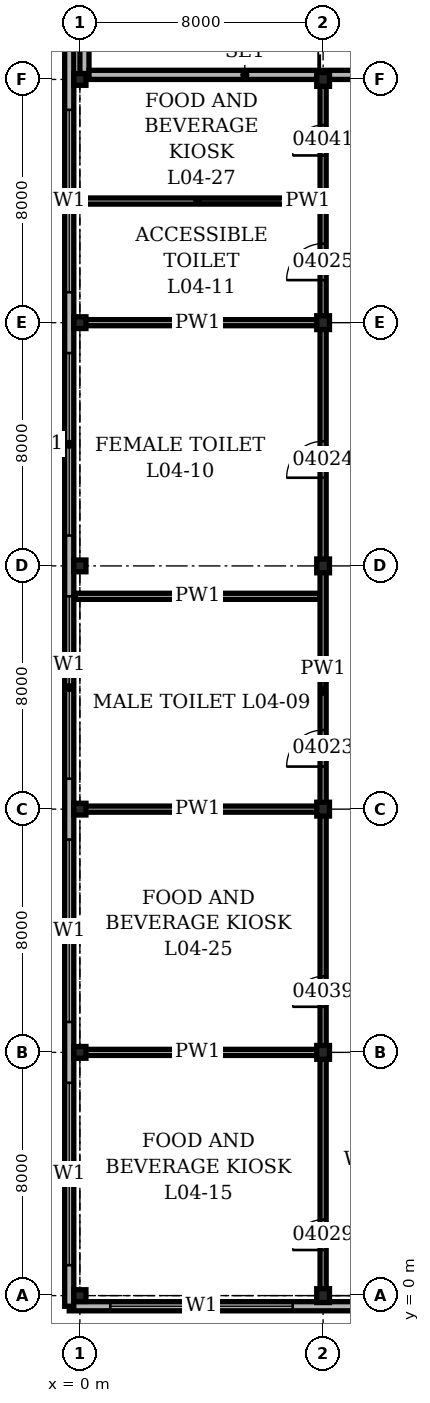
"""IFC4 building model, lengths in metres.
Left out: names, types, materials, properties, quantities, classifications, styles, units other than length and angle.
Written with IfcOpenShell. Run it as: python <this file> out.ifc"""

import sys

from ifc_helpers import new_model, si_unit, direction, frame, frame_2d, origin, origin_2d, place, context, subcontext, project, spatial, rectangle, i_section, extrude, element, fill, save


model = new_model("IFC4")
c1 = context("Model", 3, precision=1e-05, world=origin(), true_north=direction((0.0, 1.0)))
c2 = subcontext(c1, "Body", "Model", "MODEL_VIEW")
j1 = project(units=[si_unit("LENGTHUNIT", "METRE"), si_unit("PLANEANGLEUNIT", "RADIAN")], contexts=[c1])
p1 = place(None, origin())
s1 = spatial("IfcSite", under=j1, at=p1, CompositionType="ELEMENT")
p2 = place(p1, origin())
s2 = spatial("IfcBuilding", under=s1, at=p2, CompositionType="ELEMENT")
p3 = place(p2, frame((0.0, 0.0, 19.9)))
s3 = spatial("IfcBuildingStorey", under=s2, at=p3, CompositionType="ELEMENT", Elevation=19.9)
for number, where, z_axis, x_axis in (
    (1, (0.0, 0.0, 0.0), (0.0, 0.0, 1.0), (1.0, 0.0, 0.0)),
    (2, (0.0, 8.0, 0.0), (0.0, 0.0, 1.0), (1.0, 0.0, 0.0)),
    (3, (0.0, 16.0, 0.0), (0.0, 0.0, 1.0), (1.0, 0.0, 0.0)),
    (4, (0.0, 24.0, 0.0), (0.0, 0.0, 1.0), (1.0, 0.0, 0.0)),
    (5, (0.0, 32.0, 0.0), (0.0, 0.0, 1.0), (1.0, 0.0, 0.0)),
    (6, (0.0, 40.0, 0.0), (0.0, 0.0, 1.0), (1.0, 0.0, 0.0)),
):
    element("IfcColumn", number, at=place(p3, frame(where, z_axis=z_axis, x_axis=x_axis)), inside=s3, PredefinedType="COLUMN", context=c2, shape_type="SweptSolid", body=[
        extrude(i_section(OverallWidth=0.399, OverallDepth=0.386, WebThickness=0.021, FlangeThickness=0.033, at=origin_2d()), origin(), (0.0, 0.0, 1.0), 6.0),
    ])
for number, where, z_axis, x_axis in (
    (7, (8.0, 0.0, 0.0), (0.0, 0.0, 1.0), (1.0, 0.0, 0.0)),
    (8, (8.0, 8.0, 0.0), (0.0, 0.0, 1.0), (1.0, 0.0, 0.0)),
    (9, (8.0, 16.0, 0.0), (0.0, 0.0, 1.0), (1.0, 0.0, 0.0)),
    (10, (8.0, 24.0, 0.0), (0.0, 0.0, 1.0), (1.0, 0.0, 0.0)),
    (11, (8.0, 32.0, 0.0), (0.0, 0.0, 1.0), (1.0, 0.0, 0.0)),
    (12, (8.0, 40.0, 0.0), (0.0, 0.0, 1.0), (1.0, 0.0, 0.0)),
):
    element("IfcColumn", number, at=place(p3, frame(where, z_axis=z_axis, x_axis=x_axis)), inside=s3, PredefinedType="COLUMN", context=c2, shape_type="SweptSolid", body=[
        extrude(i_section(OverallWidth=0.419, OverallDepth=0.455, WebThickness=0.042, FlangeThickness=0.068, at=origin_2d()), origin(), (0.0, 0.0, 1.0), 6.0),
    ])
p4 = place(p3, frame((-0.35, -0.35, 0.0), z_axis=(0.0, 0.0, 1.0), x_axis=(1.0, 0.0, 0.0)))
e13 = element("IfcWall", 13, at=p4, inside=s3, PredefinedType="SOLIDWALL", context=c2, shape_type="SweptSolid", body=[
    extrude(rectangle(XDim=112.7, YDim=0.3, at=frame_2d((56.35, 0.0))), origin(), (0.0, 0.0, 1.0), 6.0),
])
p5 = place(p4, frame((1.35, 0.0, 1.0)))
e14 = element("IfcOpeningElement", 14, at=p5, cuts=e13, PredefinedType="OPENING", context=c2, shape_type="SweptSolid", body=[
    extrude(rectangle(XDim=6.0, YDim=1.5, at=frame_2d((3.0, 0.75))), frame((0.0, 0.16, 0.0), z_axis=(0.0, -1.0, 0.0), x_axis=(1.0, 0.0, 0.0)), (0.0, 0.0, 1.0), 0.32),
])
p6 = place(p4, frame((9.35, 0.0, 1.0)))
e15 = element("IfcOpeningElement", 15, at=p6, cuts=e13, PredefinedType="OPENING", context=c2, shape_type="SweptSolid", body=[
    extrude(rectangle(XDim=6.0, YDim=1.5, at=frame_2d((3.0, 0.75))), frame((0.0, 0.16, 0.0), z_axis=(0.0, -1.0, 0.0), x_axis=(1.0, 0.0, 0.0)), (0.0, 0.0, 1.0), 0.32),
])
p7 = place(p4, frame((17.35, 0.0, 1.0)))
e16 = element("IfcOpeningElement", 16, at=p7, cuts=e13, PredefinedType="OPENING", context=c2, shape_type="SweptSolid", body=[
    extrude(rectangle(XDim=6.0, YDim=1.5, at=frame_2d((3.0, 0.75))), frame((0.0, 0.16, 0.0), z_axis=(0.0, -1.0, 0.0), x_axis=(1.0, 0.0, 0.0)), (0.0, 0.0, 1.0), 0.32),
])
p8 = place(p4, frame((25.35, 0.0, 1.0)))
e17 = element("IfcOpeningElement", 17, at=p8, cuts=e13, PredefinedType="OPENING", context=c2, shape_type="SweptSolid", body=[
    extrude(rectangle(XDim=6.0, YDim=1.5, at=frame_2d((3.0, 0.75))), frame((0.0, 0.16, 0.0), z_axis=(0.0, -1.0, 0.0), x_axis=(1.0, 0.0, 0.0)), (0.0, 0.0, 1.0), 0.32),
])
p9 = place(p4, frame((33.35, 0.0, 1.0)))
e18 = element("IfcOpeningElement", 18, at=p9, cuts=e13, PredefinedType="OPENING", context=c2, shape_type="SweptSolid", body=[
    extrude(rectangle(XDim=6.0, YDim=1.5, at=frame_2d((3.0, 0.75))), frame((0.0, 0.16, 0.0), z_axis=(0.0, -1.0, 0.0), x_axis=(1.0, 0.0, 0.0)), (0.0, 0.0, 1.0), 0.32),
])
p10 = place(p4, frame((41.35, 0.0, 1.0)))
e19 = element("IfcOpeningElement", 19, at=p10, cuts=e13, PredefinedType="OPENING", context=c2, shape_type="SweptSolid", body=[
    extrude(rectangle(XDim=6.0, YDim=1.5, at=frame_2d((3.0, 0.75))), frame((0.0, 0.16, 0.0), z_axis=(0.0, -1.0, 0.0), x_axis=(1.0, 0.0, 0.0)), (0.0, 0.0, 1.0), 0.32),
])
p11 = place(p4, frame((49.35, 0.0, 1.0)))
e20 = element("IfcOpeningElement", 20, at=p11, cuts=e13, PredefinedType="OPENING", context=c2, shape_type="SweptSolid", body=[
    extrude(rectangle(XDim=6.0, YDim=1.5, at=frame_2d((3.0, 0.75))), frame((0.0, 0.16, 0.0), z_axis=(0.0, -1.0, 0.0), x_axis=(1.0, 0.0, 0.0)), (0.0, 0.0, 1.0), 0.32),
])
p12 = place(p4, frame((57.35, 0.0, 1.0)))
e21 = element("IfcOpeningElement", 21, at=p12, cuts=e13, PredefinedType="OPENING", context=c2, shape_type="SweptSolid", body=[
    extrude(rectangle(XDim=6.0, YDim=1.5, at=frame_2d((3.0, 0.75))), frame((0.0, 0.16, 0.0), z_axis=(0.0, -1.0, 0.0), x_axis=(1.0, 0.0, 0.0)), (0.0, 0.0, 1.0), 0.32),
])
p13 = place(p4, frame((65.35, 0.0, 1.0)))
e22 = element("IfcOpeningElement", 22, at=p13, cuts=e13, PredefinedType="OPENING", context=c2, shape_type="SweptSolid", body=[
    extrude(rectangle(XDim=6.0, YDim=1.5, at=frame_2d((3.0, 0.75))), frame((0.0, 0.16, 0.0), z_axis=(0.0, -1.0, 0.0), x_axis=(1.0, 0.0, 0.0)), (0.0, 0.0, 1.0), 0.32),
])
p14 = place(p4, frame((73.35, 0.0, 1.0)))
e23 = element("IfcOpeningElement", 23, at=p14, cuts=e13, PredefinedType="OPENING", context=c2, shape_type="SweptSolid", body=[
    extrude(rectangle(XDim=6.0, YDim=1.5, at=frame_2d((3.0, 0.75))), frame((0.0, 0.16, 0.0), z_axis=(0.0, -1.0, 0.0), x_axis=(1.0, 0.0, 0.0)), (0.0, 0.0, 1.0), 0.32),
])
p15 = place(p4, frame((81.35, 0.0, 1.0)))
e24 = element("IfcOpeningElement", 24, at=p15, cuts=e13, PredefinedType="OPENING", context=c2, shape_type="SweptSolid", body=[
    extrude(rectangle(XDim=6.0, YDim=1.5, at=frame_2d((3.0, 0.75))), frame((0.0, 0.16, 0.0), z_axis=(0.0, -1.0, 0.0), x_axis=(1.0, 0.0, 0.0)), (0.0, 0.0, 1.0), 0.32),
])
p16 = place(p4, frame((89.35, 0.0, 1.0)))
e25 = element("IfcOpeningElement", 25, at=p16, cuts=e13, PredefinedType="OPENING", context=c2, shape_type="SweptSolid", body=[
    extrude(rectangle(XDim=6.0, YDim=1.5, at=frame_2d((3.0, 0.75))), frame((0.0, 0.16, 0.0), z_axis=(0.0, -1.0, 0.0), x_axis=(1.0, 0.0, 0.0)), (0.0, 0.0, 1.0), 0.32),
])
p17 = place(p4, frame((97.35, 0.0, 1.0)))
e26 = element("IfcOpeningElement", 26, at=p17, cuts=e13, PredefinedType="OPENING", context=c2, shape_type="SweptSolid", body=[
    extrude(rectangle(XDim=6.0, YDim=1.5, at=frame_2d((3.0, 0.75))), frame((0.0, 0.16, 0.0), z_axis=(0.0, -1.0, 0.0), x_axis=(1.0, 0.0, 0.0)), (0.0, 0.0, 1.0), 0.32),
])
p18 = place(p4, frame((105.35, 0.0, 1.0)))
e27 = element("IfcOpeningElement", 27, at=p18, cuts=e13, PredefinedType="OPENING", context=c2, shape_type="SweptSolid", body=[
    extrude(rectangle(XDim=6.0, YDim=1.5, at=frame_2d((3.0, 0.75))), frame((0.0, 0.16, 0.0), z_axis=(0.0, -1.0, 0.0), x_axis=(1.0, 0.0, 0.0)), (0.0, 0.0, 1.0), 0.32),
])
p19 = place(p3, frame((-0.35, 112.35, 0.0), z_axis=(0.0, 0.0, 1.0), x_axis=(0.0, -1.0, 0.0)))
e28 = element("IfcWall", 28, at=p19, inside=s3, PredefinedType="SOLIDWALL", context=c2, shape_type="SweptSolid", body=[
    extrude(rectangle(XDim=112.7, YDim=0.3, at=frame_2d((56.35, 0.0))), origin(), (0.0, 0.0, 1.0), 6.0),
])
p20 = place(p19, frame((1.35, 0.0, 1.0)))
e29 = element("IfcOpeningElement", 29, at=p20, cuts=e28, PredefinedType="OPENING", context=c2, shape_type="SweptSolid", body=[
    extrude(rectangle(XDim=6.0, YDim=1.5, at=frame_2d((3.0, 0.75))), frame((0.0, 0.16, 0.0), z_axis=(0.0, -1.0, 0.0), x_axis=(1.0, 0.0, 0.0)), (0.0, 0.0, 1.0), 0.32),
])
p21 = place(p19, frame((9.35, 0.0, 1.0)))
e30 = element("IfcOpeningElement", 30, at=p21, cuts=e28, PredefinedType="OPENING", context=c2, shape_type="SweptSolid", body=[
    extrude(rectangle(XDim=6.0, YDim=1.5, at=frame_2d((3.0, 0.75))), frame((0.0, 0.16, 0.0), z_axis=(0.0, -1.0, 0.0), x_axis=(1.0, 0.0, 0.0)), (0.0, 0.0, 1.0), 0.32),
])
p22 = place(p19, frame((17.35, 0.0, 1.0)))
e31 = element("IfcOpeningElement", 31, at=p22, cuts=e28, PredefinedType="OPENING", context=c2, shape_type="SweptSolid", body=[
    extrude(rectangle(XDim=6.0, YDim=1.5, at=frame_2d((3.0, 0.75))), frame((0.0, 0.16, 0.0), z_axis=(0.0, -1.0, 0.0), x_axis=(1.0, 0.0, 0.0)), (0.0, 0.0, 1.0), 0.32),
])
p23 = place(p19, frame((25.35, 0.0, 1.0)))
e32 = element("IfcOpeningElement", 32, at=p23, cuts=e28, PredefinedType="OPENING", context=c2, shape_type="SweptSolid", body=[
    extrude(rectangle(XDim=6.0, YDim=1.5, at=frame_2d((3.0, 0.75))), frame((0.0, 0.16, 0.0), z_axis=(0.0, -1.0, 0.0), x_axis=(1.0, 0.0, 0.0)), (0.0, 0.0, 1.0), 0.32),
])
p24 = place(p19, frame((33.35, 0.0, 1.0)))
e33 = element("IfcOpeningElement", 33, at=p24, cuts=e28, PredefinedType="OPENING", context=c2, shape_type="SweptSolid", body=[
    extrude(rectangle(XDim=6.0, YDim=1.5, at=frame_2d((3.0, 0.75))), frame((0.0, 0.16, 0.0), z_axis=(0.0, -1.0, 0.0), x_axis=(1.0, 0.0, 0.0)), (0.0, 0.0, 1.0), 0.32),
])
p25 = place(p19, frame((41.35, 0.0, 1.0)))
e34 = element("IfcOpeningElement", 34, at=p25, cuts=e28, PredefinedType="OPENING", context=c2, shape_type="SweptSolid", body=[
    extrude(rectangle(XDim=6.0, YDim=1.5, at=frame_2d((3.0, 0.75))), frame((0.0, 0.16, 0.0), z_axis=(0.0, -1.0, 0.0), x_axis=(1.0, 0.0, 0.0)), (0.0, 0.0, 1.0), 0.32),
])
p26 = place(p19, frame((49.35, 0.0, 1.0)))
e35 = element("IfcOpeningElement", 35, at=p26, cuts=e28, PredefinedType="OPENING", context=c2, shape_type="SweptSolid", body=[
    extrude(rectangle(XDim=6.0, YDim=1.5, at=frame_2d((3.0, 0.75))), frame((0.0, 0.16, 0.0), z_axis=(0.0, -1.0, 0.0), x_axis=(1.0, 0.0, 0.0)), (0.0, 0.0, 1.0), 0.32),
])
p27 = place(p19, frame((57.35, 0.0, 1.0)))
e36 = element("IfcOpeningElement", 36, at=p27, cuts=e28, PredefinedType="OPENING", context=c2, shape_type="SweptSolid", body=[
    extrude(rectangle(XDim=6.0, YDim=1.5, at=frame_2d((3.0, 0.75))), frame((0.0, 0.16, 0.0), z_axis=(0.0, -1.0, 0.0), x_axis=(1.0, 0.0, 0.0)), (0.0, 0.0, 1.0), 0.32),
])
p28 = place(p19, frame((65.35, 0.0, 1.0)))
e37 = element("IfcOpeningElement", 37, at=p28, cuts=e28, PredefinedType="OPENING", context=c2, shape_type="SweptSolid", body=[
    extrude(rectangle(XDim=6.0, YDim=1.5, at=frame_2d((3.0, 0.75))), frame((0.0, 0.16, 0.0), z_axis=(0.0, -1.0, 0.0), x_axis=(1.0, 0.0, 0.0)), (0.0, 0.0, 1.0), 0.32),
])
p29 = place(p19, frame((73.35, 0.0, 1.0)))
e38 = element("IfcOpeningElement", 38, at=p29, cuts=e28, PredefinedType="OPENING", context=c2, shape_type="SweptSolid", body=[
    extrude(rectangle(XDim=6.0, YDim=1.5, at=frame_2d((3.0, 0.75))), frame((0.0, 0.16, 0.0), z_axis=(0.0, -1.0, 0.0), x_axis=(1.0, 0.0, 0.0)), (0.0, 0.0, 1.0), 0.32),
])
p30 = place(p19, frame((81.35, 0.0, 1.0)))
e39 = element("IfcOpeningElement", 39, at=p30, cuts=e28, PredefinedType="OPENING", context=c2, shape_type="SweptSolid", body=[
    extrude(rectangle(XDim=6.0, YDim=1.5, at=frame_2d((3.0, 0.75))), frame((0.0, 0.16, 0.0), z_axis=(0.0, -1.0, 0.0), x_axis=(1.0, 0.0, 0.0)), (0.0, 0.0, 1.0), 0.32),
])
p31 = place(p19, frame((89.35, 0.0, 1.0)))
e40 = element("IfcOpeningElement", 40, at=p31, cuts=e28, PredefinedType="OPENING", context=c2, shape_type="SweptSolid", body=[
    extrude(rectangle(XDim=6.0, YDim=1.5, at=frame_2d((3.0, 0.75))), frame((0.0, 0.16, 0.0), z_axis=(0.0, -1.0, 0.0), x_axis=(1.0, 0.0, 0.0)), (0.0, 0.0, 1.0), 0.32),
])
p32 = place(p19, frame((97.35, 0.0, 1.0)))
e41 = element("IfcOpeningElement", 41, at=p32, cuts=e28, PredefinedType="OPENING", context=c2, shape_type="SweptSolid", body=[
    extrude(rectangle(XDim=6.0, YDim=1.5, at=frame_2d((3.0, 0.75))), frame((0.0, 0.16, 0.0), z_axis=(0.0, -1.0, 0.0), x_axis=(1.0, 0.0, 0.0)), (0.0, 0.0, 1.0), 0.32),
])
p33 = place(p19, frame((105.35, 0.0, 1.0)))
e42 = element("IfcOpeningElement", 42, at=p33, cuts=e28, PredefinedType="OPENING", context=c2, shape_type="SweptSolid", body=[
    extrude(rectangle(XDim=6.0, YDim=1.5, at=frame_2d((3.0, 0.75))), frame((0.0, 0.16, 0.0), z_axis=(0.0, -1.0, 0.0), x_axis=(1.0, 0.0, 0.0)), (0.0, 0.0, 1.0), 0.32),
])
p34 = place(p3, frame((0.15, 40.193, 0.0), z_axis=(0.0, 0.0, 1.0), x_axis=(0.0, 1.0, 0.0)))
e43 = element("IfcWall", 43, at=p34, inside=s3, PredefinedType="SOLIDWALL", context=c2, shape_type="SweptSolid", body=[
    extrude(rectangle(XDim=7.614, YDim=0.3, at=frame_2d((3.807, 0.0))), origin(), (0.0, 0.0, 1.0), 5.75),
])
p35 = place(p3, frame((0.3, 40.15, 0.0), z_axis=(0.0, 0.0, 1.0), x_axis=(1.0, 0.0, 0.0)))
e44 = element("IfcWall", 44, at=p35, inside=s3, PredefinedType="SOLIDWALL", context=c2, shape_type="SweptSolid", body=[
    extrude(rectangle(XDim=10.25, YDim=0.3, at=frame_2d((5.125, 0.0))), origin(), (0.0, 0.0, 1.0), 5.75),
])
for number, where, z_axis, x_axis in (
    (45, (-0.15, 8.0, 0.0), (0.0, 0.0, 1.0), (1.0, 0.0, 0.0)),
    (46, (-0.15, 16.0, 0.0), (0.0, 0.0, 1.0), (1.0, 0.0, 0.0)),
):
    element("IfcWall", number, at=place(p3, frame(where, z_axis=z_axis, x_axis=x_axis)), inside=s3, PredefinedType="PARTITIONING", context=c2, shape_type="SweptSolid", body=[
        extrude(rectangle(XDim=8.05, YDim=0.2, at=frame_2d((4.025, 0.0))), origin(), (0.0, 0.0, 1.0), 4.978),
    ])
p36 = place(p3, frame((-0.15, 23.0, 0.0), z_axis=(0.0, 0.0, 1.0), x_axis=(1.0, 0.0, 0.0)))
e47 = element("IfcWall", 47, at=p36, inside=s3, PredefinedType="PARTITIONING", context=c2, shape_type="SweptSolid", body=[
    extrude(rectangle(XDim=8.05, YDim=0.2, at=frame_2d((4.025, 0.0))), origin(), (0.0, 0.0, 1.0), 5.75),
])
p37 = place(p3, frame((-0.15, 32.0, 0.0), z_axis=(0.0, 0.0, 1.0), x_axis=(1.0, 0.0, 0.0)))
e48 = element("IfcWall", 48, at=p37, inside=s3, PredefinedType="PARTITIONING", context=c2, shape_type="SweptSolid", body=[
    extrude(rectangle(XDim=8.05, YDim=0.2, at=frame_2d((4.025, 0.0))), origin(), (0.0, 0.0, 1.0), 4.978),
])
p38 = place(p3, frame((-0.15, 36.0, 0.0), z_axis=(0.0, 0.0, 1.0), x_axis=(1.0, 0.0, 0.0)))
e49 = element("IfcWall", 49, at=p38, inside=s3, PredefinedType="PARTITIONING", context=c2, shape_type="SweptSolid", body=[
    extrude(rectangle(XDim=8.05, YDim=0.2, at=frame_2d((4.025, 0.0))), origin(), (0.0, 0.0, 1.0), 5.75),
])
p39 = place(p3, frame((8.0, -0.15, 0.0), z_axis=(0.0, 0.0, 1.0), x_axis=(0.0, 1.0, 0.0)))
e50 = element("IfcWall", 50, at=p39, inside=s3, PredefinedType="PARTITIONING", context=c2, shape_type="SweptSolid", body=[
    extrude(rectangle(XDim=40.05, YDim=0.2, at=frame_2d((20.025, 0.0))), origin(), (0.0, 0.0, 1.0), 4.978),
])
p40 = place(p39, frame((17.55, 0.0, 0.0)))
e51 = element("IfcOpeningElement", 51, at=p40, cuts=e50, PredefinedType="OPENING", context=c2, shape_type="SweptSolid", body=[
    extrude(rectangle(XDim=1.2, YDim=2.1, at=frame_2d((0.6, 1.05))), frame((0.0, 0.11, 0.0), z_axis=(0.0, -1.0, 0.0), x_axis=(1.0, 0.0, 0.0)), (0.0, 0.0, 1.0), 0.22),
])
p41 = place(p39, frame((27.05, 0.0, 0.0)))
e52 = element("IfcOpeningElement", 52, at=p41, cuts=e50, PredefinedType="OPENING", context=c2, shape_type="SweptSolid", body=[
    extrude(rectangle(XDim=1.2, YDim=2.1, at=frame_2d((0.6, 1.05))), frame((0.0, 0.11, 0.0), z_axis=(0.0, -1.0, 0.0), x_axis=(1.0, 0.0, 0.0)), (0.0, 0.0, 1.0), 0.22),
])
p42 = place(p39, frame((33.55, 0.0, 0.0)))
e53 = element("IfcOpeningElement", 53, at=p42, cuts=e50, PredefinedType="OPENING", context=c2, shape_type="SweptSolid", body=[
    extrude(rectangle(XDim=1.2, YDim=2.1, at=frame_2d((0.6, 1.05))), frame((0.0, 0.11, 0.0), z_axis=(0.0, -1.0, 0.0), x_axis=(1.0, 0.0, 0.0)), (0.0, 0.0, 1.0), 0.22),
])
p43 = place(p39, frame((1.65, 0.0, 0.0)))
e54 = element("IfcOpeningElement", 54, at=p43, cuts=e50, PredefinedType="OPENING", context=c2, shape_type="SweptSolid", body=[
    extrude(rectangle(XDim=1.0, YDim=2.1, at=frame_2d((0.5, 1.05))), frame((0.0, 0.11, 0.0), z_axis=(0.0, -1.0, 0.0), x_axis=(1.0, 0.0, 0.0)), (0.0, 0.0, 1.0), 0.22),
])
p44 = place(p39, frame((9.65, 0.0, 0.0)))
e55 = element("IfcOpeningElement", 55, at=p44, cuts=e50, PredefinedType="OPENING", context=c2, shape_type="SweptSolid", body=[
    extrude(rectangle(XDim=1.0, YDim=2.1, at=frame_2d((0.5, 1.05))), frame((0.0, 0.11, 0.0), z_axis=(0.0, -1.0, 0.0), x_axis=(1.0, 0.0, 0.0)), (0.0, 0.0, 1.0), 0.22),
])
p45 = place(p39, frame((37.65, 0.0, 0.0)))
e56 = element("IfcOpeningElement", 56, at=p45, cuts=e50, PredefinedType="OPENING", context=c2, shape_type="SweptSolid", body=[
    extrude(rectangle(XDim=1.0, YDim=2.1, at=frame_2d((0.5, 1.05))), frame((0.0, 0.11, 0.0), z_axis=(0.0, -1.0, 0.0), x_axis=(1.0, 0.0, 0.0)), (0.0, 0.0, 1.0), 0.22),
])
p46 = place(p5, origin())
e57 = element("IfcWindow", 57, at=p46, inside=s3, PartitioningType="SINGLE_PANEL", PredefinedType="WINDOW", context=c2, shape_type="SweptSolid", body=[
    extrude(rectangle(XDim=6.0, YDim=1.5, at=frame_2d((3.0, 0.75))), frame((0.0, 0.03, 0.0), z_axis=(0.0, -1.0, 0.0), x_axis=(1.0, 0.0, 0.0)), (0.0, 0.0, 1.0), 0.06),
])
fill(e14, e57)
p47 = place(p29, origin())
e58 = element("IfcWindow", 58, at=p47, inside=s3, PartitioningType="SINGLE_PANEL", PredefinedType="WINDOW", context=c2, shape_type="SweptSolid", body=[
    extrude(rectangle(XDim=6.0, YDim=1.5, at=frame_2d((3.0, 0.75))), frame((0.0, 0.03, 0.0), z_axis=(0.0, -1.0, 0.0), x_axis=(1.0, 0.0, 0.0)), (0.0, 0.0, 1.0), 0.06),
])
fill(e38, e58)
p48 = place(p30, origin())
e59 = element("IfcWindow", 59, at=p48, inside=s3, PartitioningType="SINGLE_PANEL", PredefinedType="WINDOW", context=c2, shape_type="SweptSolid", body=[
    extrude(rectangle(XDim=6.0, YDim=1.5, at=frame_2d((3.0, 0.75))), frame((0.0, 0.03, 0.0), z_axis=(0.0, -1.0, 0.0), x_axis=(1.0, 0.0, 0.0)), (0.0, 0.0, 1.0), 0.06),
])
fill(e39, e59)
p49 = place(p31, origin())
e60 = element("IfcWindow", 60, at=p49, inside=s3, PartitioningType="SINGLE_PANEL", PredefinedType="WINDOW", context=c2, shape_type="SweptSolid", body=[
    extrude(rectangle(XDim=6.0, YDim=1.5, at=frame_2d((3.0, 0.75))), frame((0.0, 0.03, 0.0), z_axis=(0.0, -1.0, 0.0), x_axis=(1.0, 0.0, 0.0)), (0.0, 0.0, 1.0), 0.06),
])
fill(e40, e60)
p50 = place(p32, origin())
e61 = element("IfcWindow", 61, at=p50, inside=s3, PartitioningType="SINGLE_PANEL", PredefinedType="WINDOW", context=c2, shape_type="SweptSolid", body=[
    extrude(rectangle(XDim=6.0, YDim=1.5, at=frame_2d((3.0, 0.75))), frame((0.0, 0.03, 0.0), z_axis=(0.0, -1.0, 0.0), x_axis=(1.0, 0.0, 0.0)), (0.0, 0.0, 1.0), 0.06),
])
fill(e41, e61)
p51 = place(p33, origin())
e62 = element("IfcWindow", 62, at=p51, inside=s3, PartitioningType="SINGLE_PANEL", PredefinedType="WINDOW", context=c2, shape_type="SweptSolid", body=[
    extrude(rectangle(XDim=6.0, YDim=1.5, at=frame_2d((3.0, 0.75))), frame((0.0, 0.03, 0.0), z_axis=(0.0, -1.0, 0.0), x_axis=(1.0, 0.0, 0.0)), (0.0, 0.0, 1.0), 0.06),
])
fill(e42, e62)
p52 = place(p40, origin())
e63 = element("IfcDoor", 63, at=p52, inside=s3, OperationType="SINGLE_SWING_RIGHT", PredefinedType="DOOR", context=c2, shape_type="SweptSolid", body=[
    extrude(rectangle(XDim=1.2, YDim=2.1, at=frame_2d((0.6, 1.05))), frame((0.0, 0.1, 0.0), z_axis=(0.0, -1.0, 0.0), x_axis=(1.0, 0.0, 0.0)), (0.0, 0.0, 1.0), 0.199),
])
fill(e51, e63)
p53 = place(p41, origin())
e64 = element("IfcDoor", 64, at=p53, inside=s3, OperationType="SINGLE_SWING_RIGHT", PredefinedType="DOOR", context=c2, shape_type="SweptSolid", body=[
    extrude(rectangle(XDim=1.2, YDim=2.1, at=frame_2d((0.6, 1.05))), frame((0.0, 0.1, 0.0), z_axis=(0.0, -1.0, 0.0), x_axis=(1.0, 0.0, 0.0)), (0.0, 0.0, 1.0), 0.199),
])
fill(e52, e64)
p54 = place(p42, origin())
e65 = element("IfcDoor", 65, at=p54, inside=s3, OperationType="SINGLE_SWING_RIGHT", PredefinedType="DOOR", context=c2, shape_type="SweptSolid", body=[
    extrude(rectangle(XDim=1.2, YDim=2.1, at=frame_2d((0.6, 1.05))), frame((0.0, 0.1, 0.0), z_axis=(0.0, -1.0, 0.0), x_axis=(1.0, 0.0, 0.0)), (0.0, 0.0, 1.0), 0.199),
])
fill(e53, e65)
p55 = place(p43, origin())
e66 = element("IfcDoor", 66, at=p55, inside=s3, OperationType="SINGLE_SWING_LEFT", PredefinedType="DOOR", context=c2, shape_type="SweptSolid", body=[
    extrude(rectangle(XDim=1.0, YDim=2.1, at=frame_2d((0.5, 1.05))), frame((0.0, 0.1, 0.0), z_axis=(0.0, -1.0, 0.0), x_axis=(1.0, 0.0, 0.0)), (0.0, 0.0, 1.0), 0.199),
])
fill(e54, e66)
p56 = place(p44, origin())
e67 = element("IfcDoor", 67, at=p56, inside=s3, OperationType="SINGLE_SWING_LEFT", PredefinedType="DOOR", context=c2, shape_type="SweptSolid", body=[
    extrude(rectangle(XDim=1.0, YDim=2.1, at=frame_2d((0.5, 1.05))), frame((0.0, 0.1, 0.0), z_axis=(0.0, -1.0, 0.0), x_axis=(1.0, 0.0, 0.0)), (0.0, 0.0, 1.0), 0.199),
])
fill(e55, e67)
p57 = place(p45, origin())
e68 = element("IfcDoor", 68, at=p57, inside=s3, OperationType="SINGLE_SWING_LEFT", PredefinedType="DOOR", context=c2, shape_type="SweptSolid", body=[
    extrude(rectangle(XDim=1.0, YDim=2.1, at=frame_2d((0.5, 1.05))), frame((0.0, 0.1, 0.0), z_axis=(0.0, -1.0, 0.0), x_axis=(1.0, 0.0, 0.0)), (0.0, 0.0, 1.0), 0.199),
])
fill(e56, e68)
save(model, sys.argv[1])
